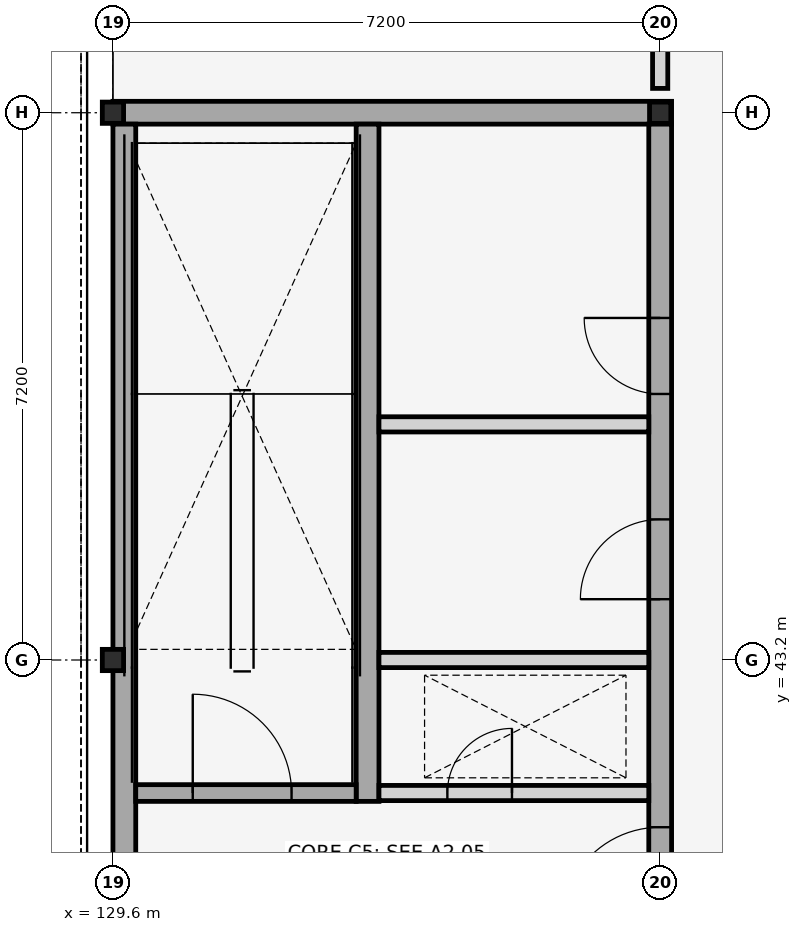
"""IFC4 building model, lengths in metres.
Left out: names, types, materials, properties, quantities, classifications, styles, units other than length and angle.
Written with IfcOpenShell. Run it as: python <this file> out.ifc"""

import sys

from ifc_helpers import new_model, si_unit, direction, frame, frame_2d, origin, origin_2d, place, context, subcontext, project, spatial, rectangle, i_section, extrude, element, fill, save


model = new_model("IFC4")
c1 = context("Model", 3, precision=1e-05, world=origin(), true_north=direction((0.0, 1.0)))
c2 = subcontext(c1, "Body", "Model", "MODEL_VIEW")
j1 = project(units=[si_unit("LENGTHUNIT", "METRE"), si_unit("PLANEANGLEUNIT", "RADIAN")], contexts=[c1])
p1 = place(None, origin())
s1 = spatial("IfcSite", under=j1, at=p1, CompositionType="ELEMENT")
p2 = place(p1, origin())
s2 = spatial("IfcBuilding", under=s1, at=p2, CompositionType="ELEMENT")
p3 = place(p2, frame((0.0, 0.0, 4.5)))
s3 = spatial("IfcBuildingStorey", under=s2, at=p3, CompositionType="ELEMENT", Elevation=4.5)
for number, where, z_axis, x_axis in (
    (1, (129.6, 43.2, 0.0), (0.0, 0.0, 1.0), (1.0, 0.0, 0.0)),
    (2, (129.6, 50.4, 0.0), (0.0, 0.0, 1.0), (0.0, 1.0, 0.0)),
    (3, (136.8, 50.4, 0.0), (0.0, 0.0, 1.0), (1.0, 0.0, 0.0)),
):
    element("IfcColumn", number, at=place(p3, frame(where, z_axis=z_axis, x_axis=x_axis)), inside=s3, PredefinedType="COLUMN", context=c2, shape_type="SweptSolid", body=[
        extrude(i_section(OverallWidth=0.28, OverallDepth=0.28, WebThickness=0.01, FlangeThickness=0.018, FilletRadius=0.024, at=origin_2d()), origin(), (0.0, 0.0, 1.0), 4.2),
    ])
p4 = place(p3, frame((129.6, 50.4, 0.0), z_axis=(0.0, 0.0, 1.0), x_axis=(1.0, 0.0, 0.0)))
e4 = element("IfcWall", 4, at=p4, inside=s3, PredefinedType="SHEAR", context=c2, shape_type="SweptSolid", body=[
    extrude(rectangle(XDim=7.35, YDim=0.3, at=frame_2d((3.675, 0.0))), origin(), (0.0, 0.0, 1.0), 3.98),
])
p5 = place(p3, frame((129.75, 36.15, 0.0), z_axis=(0.0, 0.0, 1.0), x_axis=(0.0, 1.0, 0.0)))
e5 = element("IfcWall", 5, at=p5, inside=s3, PredefinedType="SHEAR", context=c2, shape_type="SweptSolid", body=[
    extrude(rectangle(XDim=14.1, YDim=0.3, at=frame_2d((7.05, 0.0))), origin(), (0.0, 0.0, 1.0), 3.98),
])
p6 = place(p3, frame((136.8, 36.15, 0.0), z_axis=(0.0, 0.0, 1.0), x_axis=(0.0, 1.0, 0.0)))
e6 = element("IfcWall", 6, at=p6, inside=s3, PredefinedType="SHEAR", context=c2, shape_type="SweptSolid", body=[
    extrude(rectangle(XDim=14.1, YDim=0.3, at=frame_2d((7.05, 0.0))), origin(), (0.0, 0.0, 1.0), 3.98),
])
p7 = place(p6, frame((3.55, 0.0, 0.0)))
e7 = element("IfcOpeningElement", 7, at=p7, cuts=e6, PredefinedType="OPENING", context=c2, shape_type="SweptSolid", body=[
    extrude(rectangle(XDim=1.3, YDim=2.2, at=frame_2d((0.65, 1.1))), frame((0.0, 0.16, 0.0), z_axis=(0.0, -1.0, 0.0), x_axis=(1.0, 0.0, 0.0)), (0.0, 0.0, 1.0), 0.32),
])
p8 = place(p6, frame((7.85, 0.0, 0.0)))
e8 = element("IfcOpeningElement", 8, at=p8, cuts=e6, PredefinedType="OPENING", context=c2, shape_type="SweptSolid", body=[
    extrude(rectangle(XDim=1.05, YDim=2.15, at=frame_2d((0.525, 1.075))), frame((0.0, 0.16, 0.0), z_axis=(0.0, -1.0, 0.0), x_axis=(1.0, 0.0, 0.0)), (0.0, 0.0, 1.0), 0.32),
])
p9 = place(p6, frame((10.55, 0.0, 0.0)))
e9 = element("IfcOpeningElement", 9, at=p9, cuts=e6, PredefinedType="OPENING", context=c2, shape_type="SweptSolid", body=[
    extrude(rectangle(XDim=1.0, YDim=2.15, at=frame_2d((0.5, 1.075))), frame((0.0, 0.16, 0.0), z_axis=(0.0, -1.0, 0.0), x_axis=(1.0, 0.0, 0.0)), (0.0, 0.0, 1.0), 0.32),
])
p10 = place(p3, frame((132.95, 41.34, 0.0), z_axis=(0.0, 0.0, 1.0), x_axis=(0.0, 1.0, 0.0)))
e10 = element("IfcWall", 10, at=p10, inside=s3, PredefinedType="SHEAR", context=c2, shape_type="SweptSolid", body=[
    extrude(rectangle(XDim=8.91, YDim=0.3, at=frame_2d((4.455, 0.0))), origin(), (0.0, 0.0, 1.0), 3.98),
])
p11 = place(p3, frame((133.1, 41.45, 0.0), z_axis=(0.0, 0.0, 1.0), x_axis=(1.0, 0.0, 0.0)))
e11 = element("IfcWall", 11, at=p11, inside=s3, PredefinedType="PLUMBINGWALL", context=c2, shape_type="SweptSolid", body=[
    extrude(rectangle(XDim=3.55, YDim=0.2, at=frame_2d((1.775, 0.0))), origin(), (0.0, 0.0, 1.0), 3.4),
])
p12 = place(p11, frame((0.9, 0.0, 0.0)))
e12 = element("IfcOpeningElement", 12, at=p12, cuts=e11, PredefinedType="OPENING", context=c2, shape_type="SweptSolid", body=[
    extrude(rectangle(XDim=0.85, YDim=2.05, at=frame_2d((0.425, 1.025))), frame((0.0, 0.11, 0.0), z_axis=(0.0, -1.0, 0.0), x_axis=(1.0, 0.0, 0.0)), (0.0, 0.0, 1.0), 0.22),
])
p13 = place(p3, frame((129.9, 41.45, 0.0), z_axis=(0.0, 0.0, 1.0), x_axis=(1.0, 0.0, 0.0)))
e13 = element("IfcWall", 13, at=p13, inside=s3, PredefinedType="SHEAR", context=c2, shape_type="SweptSolid", body=[
    extrude(rectangle(XDim=2.9, YDim=0.22, at=frame_2d((1.45, 0.0))), origin(), (0.0, 0.0, 1.0), 3.98),
])
p14 = place(p13, frame((0.75, 0.0, 0.0)))
e14 = element("IfcOpeningElement", 14, at=p14, cuts=e13, PredefinedType="OPENING", context=c2, shape_type="SweptSolid", body=[
    extrude(rectangle(XDim=1.3, YDim=2.2, at=frame_2d((0.65, 1.1))), frame((0.0, 0.12, 0.0), z_axis=(0.0, -1.0, 0.0), x_axis=(1.0, 0.0, 0.0)), (0.0, 0.0, 1.0), 0.24),
])
for number, where, z_axis, x_axis in (
    (15, (133.1, 43.2, 0.0), (0.0, 0.0, 1.0), (1.0, 0.0, 0.0)),
    (16, (133.1, 46.3, 0.0), (0.0, 0.0, 1.0), (1.0, 0.0, 0.0)),
):
    element("IfcWall", number, at=place(p3, frame(where, z_axis=z_axis, x_axis=x_axis)), inside=s3, PredefinedType="PLUMBINGWALL", context=c2, shape_type="SweptSolid", body=[
        extrude(rectangle(XDim=3.55, YDim=0.2, at=frame_2d((1.775, 0.0))), origin(), (0.0, 0.0, 1.0), 3.4),
    ])
p15 = place(p3, frame((136.8, 50.72, 0.0), z_axis=(0.0, 0.0, 1.0), x_axis=(0.0, 1.0, 0.0)))
e17 = element("IfcWall", 17, at=p15, inside=s3, PredefinedType="PARTITIONING", context=c2, shape_type="SweptSolid", body=[
    extrude(rectangle(XDim=28.16, YDim=0.2, at=frame_2d((14.08, 0.0))), origin(), (0.0, 0.0, 1.0), 3.15),
])
p16 = place(p15, frame((1.699, 0.0, 0.0)))
e18 = element("IfcOpeningElement", 18, at=p16, cuts=e17, PredefinedType="OPENING", context=c2, shape_type="SweptSolid", body=[
    extrude(rectangle(XDim=1.5, YDim=2.25, at=frame_2d((0.75, 1.125))), frame((0.0, 0.11, 0.0), z_axis=(0.0, -1.0, 0.0), x_axis=(1.0, 0.0, 0.0)), (0.0, 0.0, 1.0), 0.22),
])
p17 = place(p7, origin())
e19 = element("IfcDoor", 19, at=p17, inside=s3, OperationType="SINGLE_SWING_LEFT", PredefinedType="DOOR", context=c2, shape_type="SweptSolid", body=[
    extrude(rectangle(XDim=1.3, YDim=2.2, at=frame_2d((0.65, 1.1))), frame((0.0, 0.025, 0.0), z_axis=(0.0, -1.0, 0.0), x_axis=(1.0, 0.0, 0.0)), (0.0, 0.0, 1.0), 0.05),
])
fill(e7, e19)
p18 = place(p8, origin())
e20 = element("IfcDoor", 20, at=p18, inside=s3, OperationType="SINGLE_SWING_LEFT", PredefinedType="DOOR", context=c2, shape_type="SweptSolid", body=[
    extrude(rectangle(XDim=1.05, YDim=2.15, at=frame_2d((0.525, 1.075))), frame((0.0, 0.025, 0.0), z_axis=(0.0, -1.0, 0.0), x_axis=(1.0, 0.0, 0.0)), (0.0, 0.0, 1.0), 0.05),
])
fill(e8, e20)
p19 = place(p9, origin())
e21 = element("IfcDoor", 21, at=p19, inside=s3, OperationType="SINGLE_SWING_RIGHT", PredefinedType="DOOR", context=c2, shape_type="SweptSolid", body=[
    extrude(rectangle(XDim=1.0, YDim=2.15, at=frame_2d((0.5, 1.075))), frame((0.0, 0.025, 0.0), z_axis=(0.0, -1.0, 0.0), x_axis=(1.0, 0.0, 0.0)), (0.0, 0.0, 1.0), 0.05),
])
fill(e9, e21)
p20 = place(p12, origin())
e22 = element("IfcDoor", 22, at=p20, inside=s3, OperationType="SINGLE_SWING_RIGHT", PredefinedType="TRAPDOOR", context=c2, shape_type="SweptSolid", body=[
    extrude(rectangle(XDim=0.85, YDim=2.05, at=frame_2d((0.425, 1.025))), frame((0.0, 0.025, 0.0), z_axis=(0.0, -1.0, 0.0), x_axis=(1.0, 0.0, 0.0)), (0.0, 0.0, 1.0), 0.05),
])
fill(e12, e22)
p21 = place(p14, origin())
e23 = element("IfcDoor", 23, at=p21, inside=s3, OperationType="SINGLE_SWING_LEFT", PredefinedType="DOOR", context=c2, shape_type="SweptSolid", body=[
    extrude(rectangle(XDim=1.3, YDim=2.2, at=frame_2d((0.65, 1.1))), frame((0.0, 0.025, 0.0), z_axis=(0.0, -1.0, 0.0), x_axis=(1.0, 0.0, 0.0)), (0.0, 0.0, 1.0), 0.05),
])
fill(e14, e23)
save(model, sys.argv[1])
